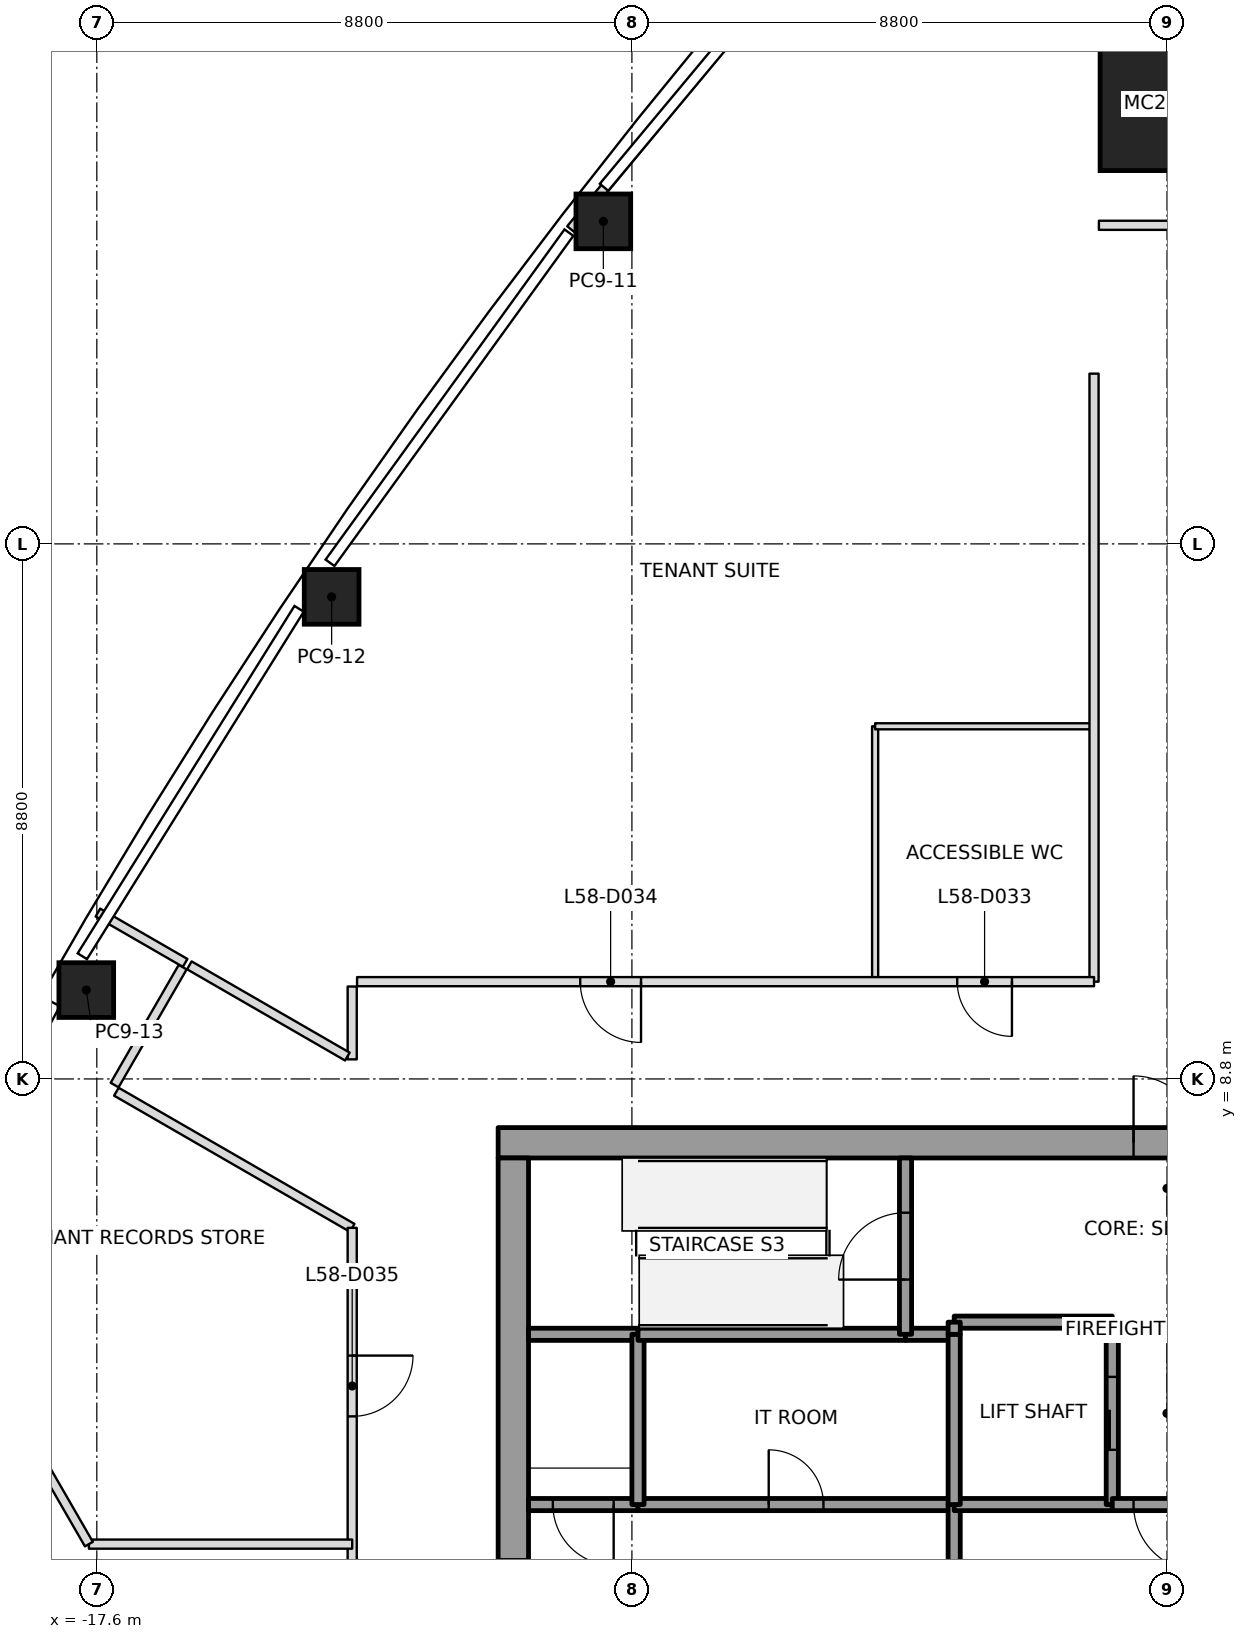
"""IFC4 building model, lengths in metres.
Left out: names, types, materials, properties, quantities, classifications, styles, units other than length and angle.
Written with IfcOpenShell. Run it as: python <this file> out.ifc"""

import sys

from ifc_helpers import new_model, si_unit, direction, frame, frame_2d, origin, origin_2d, place, context, subcontext, project, spatial, rectangle, extrude, element, fill, save


model = new_model("IFC4")
c1 = context("Model", 3, precision=1e-05, world=origin(), true_north=direction((0.0, 1.0)))
c2 = subcontext(c1, "Body", "Model", "MODEL_VIEW")
j1 = project(units=[si_unit("LENGTHUNIT", "METRE"), si_unit("PLANEANGLEUNIT", "RADIAN")], contexts=[c1])
p1 = place(None, origin())
s1 = spatial("IfcSite", under=j1, at=p1, CompositionType="ELEMENT")
p2 = place(p1, origin())
s2 = spatial("IfcBuilding", under=s1, at=p2, CompositionType="ELEMENT")
p3 = place(p2, frame((0.0, 0.0, 259.0)))
s3 = spatial("IfcBuildingStorey", under=s2, at=p3, CompositionType="ELEMENT", Elevation=259.0)
p4 = place(p3, frame((0.0, 24.84, 0.0), z_axis=(0.0, -0.032087959942, 0.999485048826), x_axis=(1.0, 0.0, 0.0)))
e1 = element("IfcColumn", 1, at=p4, inside=s3, PredefinedType="COLUMN", context=c2, shape_type="SweptSolid", body=[
    extrude(rectangle(XDim=2.2, YDim=2.2, at=origin_2d()), origin(), (0.0, 0.0, 1.0), 4.002),
])
p5 = place(p3, frame((-9.27, 22.905, 0.0), z_axis=(0.000244090207, -0.020320509722, 0.999793487329), x_axis=(0.613548105962, 0.789497322762, 0.015896509769)))
e2 = element("IfcColumn", 2, at=p5, inside=s3, PredefinedType="COLUMN", context=c2, shape_type="SweptSolid", body=[
    extrude(rectangle(XDim=0.9, YDim=0.9, at=origin_2d()), origin(), (0.0, 0.0, 1.0), 4.001),
])
p6 = place(p3, frame((-13.738, 16.729, 0.0), z_axis=(0.005309522349, -0.013182262383, 0.999899013366), x_axis=(0.558073282327, 0.829753336419, 0.007975729071)))
e3 = element("IfcColumn", 3, at=p6, inside=s3, PredefinedType="COLUMN", context=c2, shape_type="SweptSolid", body=[
    extrude(rectangle(XDim=0.9, YDim=0.9, at=origin_2d()), origin(), (0.0, 0.0, 1.0), 4.0),
])
p7 = place(p3, frame((-17.773, 10.261, 0.0), z_axis=(0.009887049298, -0.00573692984, 0.999934664812), x_axis=(0.499975560967, 0.866039512843, 2.5126546e-05)))
e4 = element("IfcColumn", 4, at=p7, inside=s3, PredefinedType="COLUMN", context=c2, shape_type="SweptSolid", body=[
    extrude(rectangle(XDim=0.9, YDim=0.9, at=origin_2d()), origin(), (0.0, 0.0, 1.0), 4.0),
])
p8 = place(p3, frame((-11.0, 7.75, 0.0), z_axis=(0.0, 0.0, 1.0), x_axis=(1.0, 0.0, 0.0)))
e5 = element("IfcWall", 5, at=p8, inside=s3, PredefinedType="SHEAR", context=c2, shape_type="SweptSolid", body=[
    extrude(rectangle(XDim=22.0, YDim=0.5, at=frame_2d((11.0, 0.0))), origin(), (0.0, 0.0, 1.0), 4.0),
])
p9 = place(p8, frame((10.45, 0.0, 0.0)))
e6 = element("IfcOpeningElement", 6, at=p9, cuts=e5, PredefinedType="OPENING", context=c2, shape_type="SweptSolid", body=[
    extrude(rectangle(XDim=1.1, YDim=2.1, at=frame_2d((0.55, 1.05))), frame((0.0, 0.25, 0.0), z_axis=(0.0, -1.0, 0.0), x_axis=(1.0, 0.0, 0.0)), (0.0, 0.0, 1.0), 0.5),
])
p10 = place(p3, frame((-10.75, -7.5, 0.0), z_axis=(0.0, 0.0, 1.0), x_axis=(0.0, 1.0, 0.0)))
e7 = element("IfcWall", 7, at=p10, inside=s3, PredefinedType="SHEAR", context=c2, shape_type="SweptSolid", body=[
    extrude(rectangle(XDim=15.0, YDim=0.5, at=frame_2d((7.5, 0.0))), origin(), (0.0, 0.0, 1.0), 4.0),
])
p11 = place(p10, frame((6.6, 0.0, 0.0)))
e8 = element("IfcOpeningElement", 8, at=p11, cuts=e7, PredefinedType="OPENING", context=c2, shape_type="SweptSolid", body=[
    extrude(rectangle(XDim=1.8, YDim=2.1, at=frame_2d((0.9, 1.05))), frame((0.0, 0.25, 0.0), z_axis=(0.0, -1.0, 0.0), x_axis=(1.0, 0.0, 0.0)), (0.0, 0.0, 1.0), 0.5),
])
p12 = place(p3, frame((-8.7, 1.8, 0.0), z_axis=(0.0, 0.0, 1.0), x_axis=(-1.0, 0.0, 0.0)))
e9 = element("IfcWall", 9, at=p12, inside=s3, PredefinedType="SOLIDWALL", context=c2, shape_type="SweptSolid", body=[
    extrude(rectangle(XDim=1.8, YDim=0.2, at=frame_2d((0.9, 0.0))), origin(), (0.0, 0.0, 1.0), 3.85),
])
p13 = place(p12, frame((0.4, 0.0, 0.0)))
e10 = element("IfcOpeningElement", 10, at=p13, cuts=e9, PredefinedType="OPENING", context=c2, shape_type="SweptSolid", body=[
    extrude(rectangle(XDim=1.0, YDim=2.1, at=frame_2d((0.5, 1.05))), frame((0.0, 0.1, 0.0), z_axis=(0.0, -1.0, 0.0), x_axis=(1.0, 0.0, 0.0)), (0.0, 0.0, 1.0), 0.2),
])
p14 = place(p3, frame((-8.7, 4.6, 0.0), z_axis=(0.0, 0.0, 1.0), x_axis=(-1.0, 0.0, 0.0)))
e11 = element("IfcWall", 11, at=p14, inside=s3, PredefinedType="SOLIDWALL", context=c2, shape_type="SweptSolid", body=[
    extrude(rectangle(XDim=1.8, YDim=0.2, at=frame_2d((0.9, 0.0))), origin(), (0.0, 0.0, 1.0), 3.85),
])
p15 = place(p3, frame((-8.7, 1.8, 0.0), z_axis=(0.0, 0.0, 1.0), x_axis=(1.0, 0.0, 0.0)))
e12 = element("IfcWall", 12, at=p15, inside=s3, PredefinedType="SOLIDWALL", context=c2, shape_type="SweptSolid", body=[
    extrude(rectangle(XDim=5.2, YDim=0.2, at=frame_2d((2.6, 0.0))), origin(), (0.0, 0.0, 1.0), 3.85),
])
p16 = place(p15, frame((2.15, 0.0, 0.0)))
e13 = element("IfcOpeningElement", 13, at=p16, cuts=e12, PredefinedType="OPENING", context=c2, shape_type="SweptSolid", body=[
    extrude(rectangle(XDim=0.9, YDim=2.1, at=frame_2d((0.45, 1.05))), frame((0.0, 0.1, 0.0), z_axis=(0.0, -1.0, 0.0), x_axis=(1.0, 0.0, 0.0)), (0.0, 0.0, 1.0), 0.2),
])
p17 = place(p3, frame((-8.7, 4.6, 0.0), z_axis=(0.0, 0.0, 1.0), x_axis=(0.0, -1.0, 0.0)))
e14 = element("IfcWall", 14, at=p17, inside=s3, PredefinedType="SOLIDWALL", context=c2, shape_type="SweptSolid", body=[
    extrude(rectangle(XDim=2.8, YDim=0.2, at=frame_2d((1.4, 0.0))), origin(), (0.0, 0.0, 1.0), 3.85),
])
p18 = place(p3, frame((-4.3, 4.6, 0.0), z_axis=(0.0, 0.0, 1.0), x_axis=(-1.0, 0.0, 0.0)))
e15 = element("IfcWall", 15, at=p18, inside=s3, PredefinedType="SOLIDWALL", context=c2, shape_type="SweptSolid", body=[
    extrude(rectangle(XDim=4.4, YDim=0.2, at=frame_2d((2.2, 0.0))), origin(), (0.0, 0.0, 1.0), 3.85),
])
p19 = place(p3, frame((-3.5, 4.6, 0.0), z_axis=(0.0, 0.0, 1.0), x_axis=(-1.0, 0.0, 0.0)))
e16 = element("IfcWall", 16, at=p19, inside=s3, PredefinedType="SOLIDWALL", context=c2, shape_type="SweptSolid", body=[
    extrude(rectangle(XDim=0.8, YDim=0.2, at=frame_2d((0.4, 0.0))), origin(), (0.0, 0.0, 1.0), 3.85),
])
p20 = place(p3, frame((-4.3, 4.6, 0.0), z_axis=(0.0, 0.0, 1.0), x_axis=(0.0, 1.0, 0.0)))
e17 = element("IfcWall", 17, at=p20, inside=s3, PredefinedType="SOLIDWALL", context=c2, shape_type="SweptSolid", body=[
    extrude(rectangle(XDim=2.9, YDim=0.2, at=frame_2d((1.45, 0.0))), origin(), (0.0, 0.0, 1.0), 3.85),
])
p21 = place(p20, frame((0.9, 0.0, 0.0)))
e18 = element("IfcOpeningElement", 18, at=p21, cuts=e17, PredefinedType="OPENING", context=c2, shape_type="SweptSolid", body=[
    extrude(rectangle(XDim=1.1, YDim=2.1, at=frame_2d((0.55, 1.05))), frame((0.0, 0.1, 0.0), z_axis=(0.0, -1.0, 0.0), x_axis=(1.0, 0.0, 0.0)), (0.0, 0.0, 1.0), 0.2),
])
p22 = place(p3, frame((-3.5, 1.8, 0.0), z_axis=(0.0, 0.0, 1.0), x_axis=(0.0, -1.0, 0.0)))
e19 = element("IfcWall", 19, at=p22, inside=s3, PredefinedType="SOLIDWALL", context=c2, shape_type="SweptSolid", body=[
    extrude(rectangle(XDim=3.6, YDim=0.2, at=frame_2d((1.8, 0.0))), origin(), (0.0, 0.0, 1.0), 3.85),
])
p23 = place(p22, frame((1.05, 0.0, 0.0)))
e20 = element("IfcOpeningElement", 20, at=p23, cuts=e19, PredefinedType="OPENING", context=c2, shape_type="SweptSolid", body=[
    extrude(rectangle(XDim=1.5, YDim=2.1, at=frame_2d((0.75, 1.05))), frame((0.0, 0.1, 0.0), z_axis=(0.0, -1.0, 0.0), x_axis=(1.0, 0.0, 0.0)), (0.0, 0.0, 1.0), 0.2),
])
p24 = place(p3, frame((-0.9, 1.8, 0.0), z_axis=(0.0, 0.0, 1.0), x_axis=(-1.0, 0.0, 0.0)))
e21 = element("IfcWall", 21, at=p24, inside=s3, PredefinedType="SOLIDWALL", context=c2, shape_type="SweptSolid", body=[
    extrude(rectangle(XDim=2.6, YDim=0.2, at=frame_2d((1.3, 0.0))), origin(), (0.0, 0.0, 1.0), 3.85),
])
p25 = place(p3, frame((-3.5, 1.8, 0.0), z_axis=(0.0, 0.0, 1.0), x_axis=(0.0, 1.0, 0.0)))
e22 = element("IfcWall", 22, at=p25, inside=s3, PredefinedType="SOLIDWALL", context=c2, shape_type="SweptSolid", body=[
    extrude(rectangle(XDim=2.8, YDim=0.2, at=frame_2d((1.4, 0.0))), origin(), (0.0, 0.0, 1.0), 3.85),
])
p26 = place(p3, frame((-0.9, 1.8, 0.0), z_axis=(0.0, 0.0, 1.0), x_axis=(0.0, 1.0, 0.0)))
e23 = element("IfcWall", 23, at=p26, inside=s3, PredefinedType="SOLIDWALL", context=c2, shape_type="SweptSolid", body=[
    extrude(rectangle(XDim=3.0, YDim=0.2, at=frame_2d((1.5, 0.0))), origin(), (0.0, 0.0, 1.0), 3.85),
])
p27 = place(p26, frame((0.9, 0.0, 0.0)))
e24 = element("IfcOpeningElement", 24, at=p27, cuts=e23, PredefinedType="OPENING", context=c2, shape_type="SweptSolid", body=[
    extrude(rectangle(XDim=1.2, YDim=2.1, at=frame_2d((0.6, 1.05))), frame((0.0, 0.1, 0.0), z_axis=(0.0, -1.0, 0.0), x_axis=(1.0, 0.0, 0.0)), (0.0, 0.0, 1.0), 0.2),
])
p28 = place(p3, frame((-0.9, 4.8, 0.0), z_axis=(0.0, 0.0, 1.0), x_axis=(-1.0, 0.0, 0.0)))
e25 = element("IfcWall", 25, at=p28, inside=s3, PredefinedType="SOLIDWALL", context=c2, shape_type="SweptSolid", body=[
    extrude(rectangle(XDim=2.6, YDim=0.2, at=frame_2d((1.3, 0.0))), origin(), (0.0, 0.0, 1.0), 3.85),
])
p29 = place(p3, frame((-3.5, 4.8, 0.0), z_axis=(0.0, 0.0, 1.0), x_axis=(0.0, -1.0, 0.0)))
e26 = element("IfcWall", 26, at=p29, inside=s3, PredefinedType="SOLIDWALL", context=c2, shape_type="SweptSolid", body=[
    extrude(rectangle(XDim=0.2, YDim=0.2, at=frame_2d((0.1, 0.0))), origin(), (0.0, 0.0, 1.0), 3.85),
])
p30 = place(p3, frame((0.9, 1.8, 0.0), z_axis=(0.0, 0.0, 1.0), x_axis=(-1.0, 0.0, 0.0)))
e27 = element("IfcWall", 27, at=p30, inside=s3, PredefinedType="SOLIDWALL", context=c2, shape_type="SweptSolid", body=[
    extrude(rectangle(XDim=1.8, YDim=0.2, at=frame_2d((0.9, 0.0))), origin(), (0.0, 0.0, 1.0), 3.85),
])
p31 = place(p30, frame((0.35, 0.0, 0.0)))
e28 = element("IfcOpeningElement", 28, at=p31, cuts=e27, PredefinedType="OPENING", context=c2, shape_type="SweptSolid", body=[
    extrude(rectangle(XDim=1.1, YDim=2.1, at=frame_2d((0.55, 1.05))), frame((0.0, 0.1, 0.0), z_axis=(0.0, -1.0, 0.0), x_axis=(1.0, 0.0, 0.0)), (0.0, 0.0, 1.0), 0.2),
])
p32 = place(p3, frame((-13.4, 1.149, 0.0), z_axis=(0.0, 0.0, 1.0), x_axis=(-1.0, 0.0, 0.0)))
e29 = element("IfcWall", 29, at=p32, inside=s3, PredefinedType="PARTITIONING", context=c2, shape_type="SweptSolid", body=[
    extrude(rectangle(XDim=4.33, YDim=0.15, at=frame_2d((2.165, 0.0))), origin(), (0.0, 0.0, 1.0), 3.45),
])
p33 = place(p3, frame((-17.73, 1.149, 0.0), z_axis=(0.0, 0.0, 1.0), x_axis=(-0.500002807145, 0.866023783073, 0.0)))
e30 = element("IfcWall", 30, at=p33, inside=s3, PredefinedType="PARTITIONING", context=c2, shape_type="SweptSolid", body=[
    extrude(rectangle(XDim=5.729, YDim=0.15, at=frame_2d((2.865, 0.0))), origin(), (0.0, 0.0, 1.0), 3.234),
])
p34 = place(p3, frame((-16.147, 10.708, 0.0), z_axis=(0.0, 0.0, 1.0), x_axis=(-0.866057962423, 0.499943602543, 0.0)))
e31 = element("IfcWall", 31, at=p34, inside=s3, PredefinedType="PARTITIONING", context=c2, shape_type="SweptSolid", body=[
    extrude(rectangle(XDim=1.656, YDim=0.15, at=frame_2d((0.828, 0.0))), origin(), (0.0, 0.0, 1.0), 3.234),
])
p35 = place(p3, frame((-9.806, 22.777, 0.0), z_axis=(0.0, 0.0, 1.0), x_axis=(0.637679563121, 0.770301742682, 0.0)))
e32 = element("IfcWall", 32, at=p35, inside=s3, PredefinedType="PARTITIONING", context=c2, shape_type="SweptSolid", body=[
    extrude(rectangle(XDim=4.378, YDim=0.15, at=frame_2d((2.189, 0.0))), origin(), (0.0, 0.0, 1.0), 3.45),
])
p36 = place(p3, frame((-17.278, 8.59, 0.0), z_axis=(0.0, 0.0, 1.0), x_axis=(0.866020361036, -0.500008734195, 0.0)))
e33 = element("IfcWall", 33, at=p36, inside=s3, PredefinedType="PARTITIONING", context=c2, shape_type="SweptSolid", body=[
    extrude(rectangle(XDim=4.479, YDim=0.15, at=frame_2d((2.239, 0.0))), origin(), (0.0, 0.0, 1.0), 3.45),
])
p37 = place(p3, frame((-13.4, 6.351, 0.0), z_axis=(0.0, 0.0, 1.0), x_axis=(0.0, -1.0, 0.0)))
e34 = element("IfcWall", 34, at=p37, inside=s3, PredefinedType="PARTITIONING", context=c2, shape_type="SweptSolid", body=[
    extrude(rectangle(XDim=12.702, YDim=0.15, at=frame_2d((6.351, 0.0))), origin(), (0.0, 0.0, 1.0), 3.317),
])
p38 = place(p37, frame((2.101, 0.0, 0.0)))
e35 = element("IfcOpeningElement", 35, at=p38, cuts=e34, PredefinedType="OPENING", context=c2, shape_type="SweptSolid", body=[
    extrude(rectangle(XDim=1.0, YDim=2.1, at=frame_2d((0.5, 1.05))), frame((0.0, 0.075, 0.0), z_axis=(0.0, -1.0, 0.0), x_axis=(1.0, 0.0, 0.0)), (0.0, 0.0, 1.0), 0.15),
])
p39 = place(p3, frame((-16.188, 10.639, 0.0), z_axis=(0.0, 0.0, 1.0), x_axis=(-0.500030632641, -0.866007717299, 0.0)))
e36 = element("IfcWall", 36, at=p39, inside=s3, PredefinedType="PARTITIONING", context=c2, shape_type="SweptSolid", body=[
    extrude(rectangle(XDim=2.24, YDim=0.15, at=frame_2d((1.12, 0.0))), origin(), (0.0, 0.0, 1.0), 3.45),
])
p40 = place(p3, frame((-13.4, 10.32, 0.0), z_axis=(0.0, 0.0, 1.0), x_axis=(0.0, -1.0, 0.0)))
e37 = element("IfcWall", 37, at=p40, inside=s3, PredefinedType="PARTITIONING", context=c2, shape_type="SweptSolid", body=[
    extrude(rectangle(XDim=1.198, YDim=0.15, at=frame_2d((0.599, 0.0))), origin(), (0.0, 0.0, 1.0), 3.45),
])
p41 = place(p3, frame((-13.479, 9.168, 0.0), z_axis=(0.0, 0.0, 1.0), x_axis=(-0.866041993159, 0.49997126526, 0.0)))
e38 = element("IfcWall", 38, at=p41, inside=s3, PredefinedType="PARTITIONING", context=c2, shape_type="SweptSolid", body=[
    extrude(rectangle(XDim=3.001, YDim=0.15, at=frame_2d((1.5, 0.0))), origin(), (0.0, 0.0, 1.0), 3.45),
])
p42 = place(p3, frame((-1.2, 20.4, 0.0), z_axis=(0.0, 0.0, 1.0), x_axis=(0.0, -1.0, 0.0)))
e39 = element("IfcWall", 39, at=p42, inside=s3, PredefinedType="PARTITIONING", context=c2, shape_type="SweptSolid", body=[
    extrude(rectangle(XDim=10.0, YDim=0.15, at=frame_2d((5.0, 0.0))), origin(), (0.0, 0.0, 1.0), 3.247),
])
p43 = place(p3, frame((-1.2, 10.4, 0.0), z_axis=(0.0, 0.0, 1.0), x_axis=(-1.0, 0.0, 0.0)))
e40 = element("IfcWall", 40, at=p43, inside=s3, PredefinedType="PARTITIONING", context=c2, shape_type="SweptSolid", body=[
    extrude(rectangle(XDim=12.12, YDim=0.15, at=frame_2d((6.06, 0.0))), origin(), (0.0, 0.0, 1.0), 3.443),
])
p44 = place(p43, frame((1.35, 0.0, 0.0)))
e41 = element("IfcOpeningElement", 41, at=p44, cuts=e40, PredefinedType="OPENING", context=c2, shape_type="SweptSolid", body=[
    extrude(rectangle(XDim=0.9, YDim=2.1, at=frame_2d((0.45, 1.05))), frame((0.0, 0.075, 0.0), z_axis=(0.0, -1.0, 0.0), x_axis=(1.0, 0.0, 0.0)), (0.0, 0.0, 1.0), 0.15),
])
p45 = place(p43, frame((7.45, 0.0, 0.0)))
e42 = element("IfcOpeningElement", 42, at=p45, cuts=e40, PredefinedType="OPENING", context=c2, shape_type="SweptSolid", body=[
    extrude(rectangle(XDim=1.0, YDim=2.1, at=frame_2d((0.5, 1.05))), frame((0.0, 0.075, 0.0), z_axis=(0.0, -1.0, 0.0), x_axis=(1.0, 0.0, 0.0)), (0.0, 0.0, 1.0), 0.15),
])
p46 = place(p3, frame((1.12, 22.84, 0.0), z_axis=(0.0, 0.0, 1.0), x_axis=(-1.0, 0.0, 0.0)))
e43 = element("IfcWall", 43, at=p46, inside=s3, PredefinedType="PARTITIONING", context=c2, shape_type="SweptSolid", body=[
    extrude(rectangle(XDim=2.24, YDim=0.15, at=frame_2d((1.12, 0.0))), origin(), (0.0, 0.0, 1.0), 3.233),
])
p47 = place(p3, frame((-4.8, 10.43, 0.0), z_axis=(0.0, 0.0, 1.0), x_axis=(0.0, 1.0, 0.0)))
e44 = element("IfcWall", 44, at=p47, inside=s3, PredefinedType="PARTITIONING", context=c2, shape_type="SweptSolid", body=[
    extrude(rectangle(XDim=4.17, YDim=0.1, at=frame_2d((2.085, 0.0))), origin(), (0.0, 0.0, 1.0), 3.247),
])
p48 = place(p3, frame((-4.8, 14.6, 0.0), z_axis=(0.0, 0.0, 1.0), x_axis=(1.0, 0.0, 0.0)))
e45 = element("IfcWall", 45, at=p48, inside=s3, PredefinedType="PARTITIONING", context=c2, shape_type="SweptSolid", body=[
    extrude(rectangle(XDim=3.57, YDim=0.1, at=frame_2d((1.785, 0.0))), origin(), (0.0, 0.0, 1.0), 3.45),
])
p49 = place(p44, origin())
e46 = element("IfcDoor", 46, at=p49, inside=s3, OperationType="SINGLE_SWING_LEFT", PredefinedType="DOOR", context=c2, shape_type="SweptSolid", body=[
    extrude(rectangle(XDim=0.9, YDim=2.1, at=frame_2d((0.45, 1.05))), frame((0.0, 0.025, 0.0), z_axis=(0.0, -1.0, 0.0), x_axis=(1.0, 0.0, 0.0)), (0.0, 0.0, 1.0), 0.05),
])
fill(e41, e46)
p50 = place(p45, origin())
e47 = element("IfcDoor", 47, at=p50, inside=s3, OperationType="SINGLE_SWING_LEFT", PredefinedType="DOOR", context=c2, shape_type="SweptSolid", body=[
    extrude(rectangle(XDim=1.0, YDim=2.1, at=frame_2d((0.5, 1.05))), frame((0.0, 0.025, 0.0), z_axis=(0.0, -1.0, 0.0), x_axis=(1.0, 0.0, 0.0)), (0.0, 0.0, 1.0), 0.05),
])
fill(e42, e47)
p51 = place(p38, origin())
e48 = element("IfcDoor", 48, at=p51, inside=s3, OperationType="SINGLE_SWING_RIGHT", PredefinedType="DOOR", context=c2, shape_type="SweptSolid", body=[
    extrude(rectangle(XDim=1.0, YDim=2.1, at=frame_2d((0.5, 1.05))), frame((0.0, 0.025, 0.0), z_axis=(0.0, -1.0, 0.0), x_axis=(1.0, 0.0, 0.0)), (0.0, 0.0, 1.0), 0.05),
])
fill(e35, e48)
p52 = place(p27, origin())
e49 = element("IfcDoor", 49, at=p52, inside=s3, OperationType="SLIDING_TO_RIGHT", PredefinedType="DOOR", context=c2, shape_type="SweptSolid", body=[
    extrude(rectangle(XDim=1.2, YDim=2.1, at=frame_2d((0.6, 1.05))), frame((0.0, 0.025, 0.0), z_axis=(0.0, -1.0, 0.0), x_axis=(1.0, 0.0, 0.0)), (0.0, 0.0, 1.0), 0.05),
])
fill(e24, e49)
p53 = place(p31, origin())
e50 = element("IfcDoor", 50, at=p53, inside=s3, OperationType="SINGLE_SWING_LEFT", PredefinedType="DOOR", context=c2, shape_type="SweptSolid", body=[
    extrude(rectangle(XDim=1.1, YDim=2.1, at=frame_2d((0.55, 1.05))), frame((0.0, 0.025, 0.0), z_axis=(0.0, -1.0, 0.0), x_axis=(1.0, 0.0, 0.0)), (0.0, 0.0, 1.0), 0.05),
])
fill(e28, e50)
p54 = place(p13, origin())
e51 = element("IfcDoor", 51, at=p54, inside=s3, OperationType="SINGLE_SWING_RIGHT", PredefinedType="DOOR", context=c2, shape_type="SweptSolid", body=[
    extrude(rectangle(XDim=1.0, YDim=2.1, at=frame_2d((0.5, 1.05))), frame((0.0, 0.025, 0.0), z_axis=(0.0, -1.0, 0.0), x_axis=(1.0, 0.0, 0.0)), (0.0, 0.0, 1.0), 0.05),
])
fill(e10, e51)
p55 = place(p21, origin())
e52 = element("IfcDoor", 52, at=p55, inside=s3, OperationType="SINGLE_SWING_LEFT", PredefinedType="DOOR", context=c2, shape_type="SweptSolid", body=[
    extrude(rectangle(XDim=1.1, YDim=2.1, at=frame_2d((0.55, 1.05))), frame((0.0, 0.025, 0.0), z_axis=(0.0, -1.0, 0.0), x_axis=(1.0, 0.0, 0.0)), (0.0, 0.0, 1.0), 0.05),
])
fill(e18, e52)
p56 = place(p16, origin())
e53 = element("IfcDoor", 53, at=p56, inside=s3, OperationType="SINGLE_SWING_LEFT", PredefinedType="DOOR", context=c2, shape_type="SweptSolid", body=[
    extrude(rectangle(XDim=0.9, YDim=2.1, at=frame_2d((0.45, 1.05))), frame((0.0, 0.025, 0.0), z_axis=(0.0, -1.0, 0.0), x_axis=(1.0, 0.0, 0.0)), (0.0, 0.0, 1.0), 0.05),
])
fill(e13, e53)
p57 = place(p11, origin())
e54 = element("IfcDoor", 54, at=p57, inside=s3, OperationType="DOUBLE_DOOR_SINGLE_SWING", PredefinedType="DOOR", context=c2, shape_type="SweptSolid", body=[
    extrude(rectangle(XDim=1.8, YDim=2.1, at=frame_2d((0.9, 1.05))), frame((0.0, 0.025, 0.0), z_axis=(0.0, -1.0, 0.0), x_axis=(1.0, 0.0, 0.0)), (0.0, 0.0, 1.0), 0.05),
])
fill(e8, e54)
p58 = place(p9, origin())
e55 = element("IfcDoor", 55, at=p58, inside=s3, OperationType="SINGLE_SWING_RIGHT", PredefinedType="DOOR", context=c2, shape_type="SweptSolid", body=[
    extrude(rectangle(XDim=1.1, YDim=2.1, at=frame_2d((0.55, 1.05))), frame((0.0, 0.025, 0.0), z_axis=(0.0, -1.0, 0.0), x_axis=(1.0, 0.0, 0.0)), (0.0, 0.0, 1.0), 0.05),
])
fill(e6, e55)
save(model, sys.argv[1])
